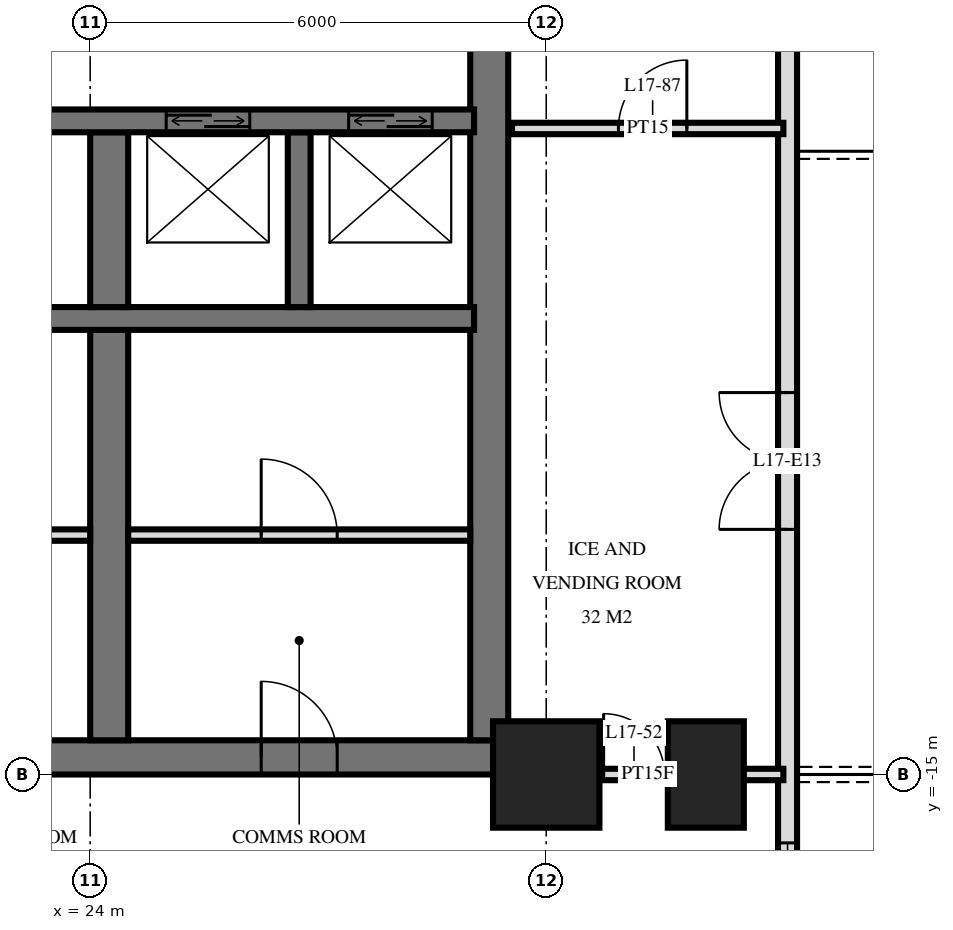
"""IFC4 building model, lengths in metres.
Left out: names, types, materials, properties, quantities, classifications, styles, units other than length and angle.
Written with IfcOpenShell. Run it as: python <this file> out.ifc"""

import sys

from ifc_helpers import new_model, si_unit, direction, frame, frame_2d, origin, origin_2d, place, context, subcontext, project, spatial, rectangle, extrude, element, fill, save


model = new_model("IFC4")
c1 = context("Model", 3, precision=1e-05, world=origin(), true_north=direction((0.0, 1.0)))
c2 = subcontext(c1, "Body", "Model", "MODEL_VIEW")
j1 = project(units=[si_unit("LENGTHUNIT", "METRE"), si_unit("PLANEANGLEUNIT", "RADIAN")], contexts=[c1])
p1 = place(None, origin())
s1 = spatial("IfcSite", under=j1, at=p1, CompositionType="ELEMENT")
p2 = place(p1, origin())
s2 = spatial("IfcBuilding", under=s1, at=p2, CompositionType="ELEMENT")
p3 = place(p2, frame((0.0, 0.0, 70.8)))
s3 = spatial("IfcBuildingStorey", under=s2, at=p3, CompositionType="ELEMENT", Elevation=70.8)
p4 = place(p3, frame((30.0, -15.0, 0.0), z_axis=(0.0, 0.0, 1.0), x_axis=(1.0, 0.0, 0.0)))
e1 = element("IfcColumn", 1, at=p4, inside=s3, PredefinedType="COLUMN", context=c2, shape_type="SweptSolid", body=[
    extrude(rectangle(XDim=1.4, YDim=1.4, at=origin_2d()), origin(), (0.0, 0.0, 1.0), 3.6),
])
p5 = place(p3, frame((32.1, -15.0, 0.0), z_axis=(0.0, 0.0, 1.0), x_axis=(0.0, 1.0, 0.0)))
e2 = element("IfcColumn", 2, at=p5, inside=s3, PredefinedType="COLUMN", context=c2, shape_type="SweptSolid", body=[
    extrude(rectangle(XDim=1.4, YDim=1.0, at=origin_2d()), origin(), (0.0, 0.0, 1.0), 3.6),
])
p6 = place(p3, frame((10.0, -14.775, 0.0), z_axis=(0.0, 0.0, 1.0), x_axis=(1.0, 0.0, 0.0)))
e3 = element("IfcWall", 3, at=p6, inside=s3, PredefinedType="SHEAR", context=c2, shape_type="SweptSolid", body=[
    extrude(rectangle(XDim=19.5, YDim=0.45, at=frame_2d((9.75, 0.0))), origin(), (0.0, 0.0, 1.0), 3.6),
])
p7 = place(p6, frame((7.1, 0.0, 0.0)))
e4 = element("IfcOpeningElement", 4, at=p7, cuts=e3, PredefinedType="OPENING", context=c2, shape_type="SweptSolid", body=[
    extrude(rectangle(XDim=1.2, YDim=2.1, at=frame_2d((0.6, 1.05))), frame((0.0, 0.235, 0.0), z_axis=(0.0, -1.0, 0.0), x_axis=(1.0, 0.0, 0.0)), (0.0, 0.0, 1.0), 0.47),
])
p8 = place(p6, frame((4.15, 0.0, 0.0)))
e5 = element("IfcOpeningElement", 5, at=p8, cuts=e3, PredefinedType="OPENING", context=c2, shape_type="SweptSolid", body=[
    extrude(rectangle(XDim=1.1, YDim=2.1, at=frame_2d((0.55, 1.05))), frame((0.0, 0.235, 0.0), z_axis=(0.0, -1.0, 0.0), x_axis=(1.0, 0.0, 0.0)), (0.0, 0.0, 1.0), 0.47),
])
p9 = place(p6, frame((10.1, 0.0, 0.0)))
e6 = element("IfcOpeningElement", 6, at=p9, cuts=e3, PredefinedType="OPENING", context=c2, shape_type="SweptSolid", body=[
    extrude(rectangle(XDim=0.9, YDim=2.1, at=frame_2d((0.45, 1.05))), frame((0.0, 0.235, 0.0), z_axis=(0.0, -1.0, 0.0), x_axis=(1.0, 0.0, 0.0)), (0.0, 0.0, 1.0), 0.47),
])
p10 = place(p6, frame((12.45, 0.0, 0.0)))
e7 = element("IfcOpeningElement", 7, at=p10, cuts=e3, PredefinedType="OPENING", context=c2, shape_type="SweptSolid", body=[
    extrude(rectangle(XDim=1.0, YDim=2.1, at=frame_2d((0.5, 1.05))), frame((0.0, 0.235, 0.0), z_axis=(0.0, -1.0, 0.0), x_axis=(1.0, 0.0, 0.0)), (0.0, 0.0, 1.0), 0.47),
])
p11 = place(p6, frame((16.25, 0.0, 0.0)))
e8 = element("IfcOpeningElement", 8, at=p11, cuts=e3, PredefinedType="OPENING", context=c2, shape_type="SweptSolid", body=[
    extrude(rectangle(XDim=1.0, YDim=2.1, at=frame_2d((0.5, 1.05))), frame((0.0, 0.235, 0.0), z_axis=(0.0, -1.0, 0.0), x_axis=(1.0, 0.0, 0.0)), (0.0, 0.0, 1.0), 0.47),
])
p12 = place(p3, frame((29.25, -14.55, 0.0), z_axis=(0.0, 0.0, 1.0), x_axis=(0.0, 1.0, 0.0)))
e9 = element("IfcWall", 9, at=p12, inside=s3, PredefinedType="SHEAR", context=c2, shape_type="SweptSolid", body=[
    extrude(rectangle(XDim=14.1, YDim=0.5, at=frame_2d((7.05, 0.0))), origin(), (0.0, 0.0, 1.0), 3.6),
])
p13 = place(p3, frame((10.35, -6.4, 0.0), z_axis=(0.0, 0.0, 1.0), x_axis=(1.0, 0.0, 0.0)))
e10 = element("IfcWall", 10, at=p13, inside=s3, PredefinedType="SHEAR", context=c2, shape_type="SweptSolid", body=[
    extrude(rectangle(XDim=18.7, YDim=0.3, at=frame_2d((9.35, 0.0))), origin(), (0.0, 0.0, 1.0), 3.6),
])
p14 = place(p13, frame((14.65, 0.0, 0.0)))
e11 = element("IfcOpeningElement", 11, at=p14, cuts=e10, PredefinedType="OPENING", context=c2, shape_type="SweptSolid", body=[
    extrude(rectangle(XDim=1.1, YDim=2.1, at=frame_2d((0.55, 1.05))), frame((0.0, 0.16, 0.0), z_axis=(0.0, -1.0, 0.0), x_axis=(1.0, 0.0, 0.0)), (0.0, 0.0, 1.0), 0.32),
])
p15 = place(p13, frame((17.05, 0.0, 0.0)))
e12 = element("IfcOpeningElement", 12, at=p15, cuts=e10, PredefinedType="OPENING", context=c2, shape_type="SweptSolid", body=[
    extrude(rectangle(XDim=1.1, YDim=2.1, at=frame_2d((0.55, 1.05))), frame((0.0, 0.16, 0.0), z_axis=(0.0, -1.0, 0.0), x_axis=(1.0, 0.0, 0.0)), (0.0, 0.0, 1.0), 0.32),
])
p16 = place(p13, frame((6.8, 0.0, 0.0)))
e13 = element("IfcOpeningElement", 13, at=p16, cuts=e10, PredefinedType="OPENING", context=c2, shape_type="SweptSolid", body=[
    extrude(rectangle(XDim=1.1, YDim=2.1, at=frame_2d((0.55, 1.05))), frame((0.0, 0.16, 0.0), z_axis=(0.0, -1.0, 0.0), x_axis=(1.0, 0.0, 0.0)), (0.0, 0.0, 1.0), 0.32),
])
p17 = place(p13, frame((12.1, 0.0, 0.0)))
e14 = element("IfcOpeningElement", 14, at=p17, cuts=e10, PredefinedType="OPENING", context=c2, shape_type="SweptSolid", body=[
    extrude(rectangle(XDim=1.0, YDim=2.1, at=frame_2d((0.5, 1.05))), frame((0.0, 0.16, 0.0), z_axis=(0.0, -1.0, 0.0), x_axis=(1.0, 0.0, 0.0)), (0.0, 0.0, 1.0), 0.32),
])
p18 = place(p3, frame((10.35, -9.0, 0.0), z_axis=(0.0, 0.0, 1.0), x_axis=(1.0, 0.0, 0.0)))
e15 = element("IfcWall", 15, at=p18, inside=s3, PredefinedType="SHEAR", context=c2, shape_type="SweptSolid", body=[
    extrude(rectangle(XDim=18.7, YDim=0.3, at=frame_2d((9.35, 0.0))), origin(), (0.0, 0.0, 1.0), 3.6),
])
p19 = place(p18, frame((3.8, 0.0, 0.0)))
e16 = element("IfcOpeningElement", 16, at=p19, cuts=e15, PredefinedType="OPENING", context=c2, shape_type="SweptSolid", body=[
    extrude(rectangle(XDim=1.1, YDim=2.1, at=frame_2d((0.55, 1.05))), frame((0.0, 0.16, 0.0), z_axis=(0.0, -1.0, 0.0), x_axis=(1.0, 0.0, 0.0)), (0.0, 0.0, 1.0), 0.32),
])
p20 = place(p3, frame((24.25, -8.85, 0.0), z_axis=(0.0, 0.0, 1.0), x_axis=(0.0, 1.0, 0.0)))
e17 = element("IfcWall", 17, at=p20, inside=s3, PredefinedType="SHEAR", context=c2, shape_type="SweptSolid", body=[
    extrude(rectangle(XDim=2.3, YDim=0.5, at=frame_2d((1.15, 0.0))), origin(), (0.0, 0.0, 1.0), 3.6),
])
p21 = place(p3, frame((24.25, -14.55, 0.0), z_axis=(0.0, 0.0, 1.0), x_axis=(0.0, 1.0, 0.0)))
e18 = element("IfcWall", 18, at=p21, inside=s3, PredefinedType="SHEAR", context=c2, shape_type="SweptSolid", body=[
    extrude(rectangle(XDim=5.4, YDim=0.5, at=frame_2d((2.7, 0.0))), origin(), (0.0, 0.0, 1.0), 3.6),
])
p22 = place(p3, frame((26.75, -8.85, 0.0), z_axis=(0.0, 0.0, 1.0), x_axis=(0.0, 1.0, 0.0)))
e19 = element("IfcWall", 19, at=p22, inside=s3, PredefinedType="SHEAR", context=c2, shape_type="SweptSolid", body=[
    extrude(rectangle(XDim=2.3, YDim=0.3, at=frame_2d((1.15, 0.0))), origin(), (0.0, 0.0, 1.0), 3.6),
])
p23 = place(p3, frame((33.175, -24.875, 0.0), z_axis=(0.0, 0.0, 1.0), x_axis=(0.0, 1.0, 0.0)))
e20 = element("IfcWall", 20, at=p23, inside=s3, PredefinedType="SOLIDWALL", context=c2, shape_type="SweptSolid", body=[
    extrude(rectangle(XDim=21.551, YDim=0.25, at=frame_2d((10.775, 0.0))), origin(), (0.0, 0.0, 1.0), 3.32),
])
p24 = place(p23, frame((0.575, 0.0, 0.0)))
e21 = element("IfcOpeningElement", 21, at=p24, cuts=e20, PredefinedType="OPENING", context=c2, shape_type="SweptSolid", body=[
    extrude(rectangle(XDim=1.8, YDim=2.4, at=frame_2d((0.9, 1.2))), frame((0.0, 0.135, 0.0), z_axis=(0.0, -1.0, 0.0), x_axis=(1.0, 0.0, 0.0)), (0.0, 0.0, 1.0), 0.27),
])
p25 = place(p23, frame((4.475, 0.0, 0.0)))
e22 = element("IfcOpeningElement", 22, at=p25, cuts=e20, PredefinedType="OPENING", context=c2, shape_type="SweptSolid", body=[
    extrude(rectangle(XDim=1.8, YDim=2.4, at=frame_2d((0.9, 1.2))), frame((0.0, 0.135, 0.0), z_axis=(0.0, -1.0, 0.0), x_axis=(1.0, 0.0, 0.0)), (0.0, 0.0, 1.0), 0.27),
])
p26 = place(p23, frame((7.775, 0.0, 0.3)))
e23 = element("IfcOpeningElement", 23, at=p26, cuts=e20, PredefinedType="OPENING", context=c2, shape_type="SweptSolid", body=[
    extrude(rectangle(XDim=1.2, YDim=2.1, at=frame_2d((0.6, 1.05))), frame((0.0, 0.135, 0.0), z_axis=(0.0, -1.0, 0.0), x_axis=(1.0, 0.0, 0.0)), (0.0, 0.0, 1.0), 0.27),
])
p27 = place(p23, frame((13.1, 0.0, 0.0)))
e24 = element("IfcOpeningElement", 24, at=p27, cuts=e20, PredefinedType="OPENING", context=c2, shape_type="SweptSolid", body=[
    extrude(rectangle(XDim=1.8, YDim=2.4, at=frame_2d((0.9, 1.2))), frame((0.0, 0.135, 0.0), z_axis=(0.0, -1.0, 0.0), x_axis=(1.0, 0.0, 0.0)), (0.0, 0.0, 1.0), 0.27),
])
p28 = place(p3, frame((21.9, -11.85, 0.0), z_axis=(0.0, 0.0, 1.0), x_axis=(1.0, 0.0, 0.0)))
e25 = element("IfcWall", 25, at=p28, inside=s3, PredefinedType="PARTITIONING", context=c2, shape_type="SweptSolid", body=[
    extrude(rectangle(XDim=2.1, YDim=0.15, at=frame_2d((1.05, 0.0))), origin(), (0.0, 0.0, 1.0), 3.3),
])
p29 = place(p28, frame((0.55, 0.0, 0.0)))
e26 = element("IfcOpeningElement", 26, at=p29, cuts=e25, PredefinedType="OPENING", context=c2, shape_type="SweptSolid", body=[
    extrude(rectangle(XDim=1.0, YDim=2.1, at=frame_2d((0.5, 1.05))), frame((0.0, 0.085, 0.0), z_axis=(0.0, -1.0, 0.0), x_axis=(1.0, 0.0, 0.0)), (0.0, 0.0, 1.0), 0.17),
])
p30 = place(p3, frame((24.5, -11.85, 0.0), z_axis=(0.0, 0.0, 1.0), x_axis=(1.0, 0.0, 0.0)))
e27 = element("IfcWall", 27, at=p30, inside=s3, PredefinedType="PARTITIONING", context=c2, shape_type="SweptSolid", body=[
    extrude(rectangle(XDim=4.5, YDim=0.15, at=frame_2d((2.25, 0.0))), origin(), (0.0, 0.0, 1.0), 3.3),
])
p31 = place(p30, frame((1.75, 0.0, 0.0)))
e28 = element("IfcOpeningElement", 28, at=p31, cuts=e27, PredefinedType="OPENING", context=c2, shape_type="SweptSolid", body=[
    extrude(rectangle(XDim=1.0, YDim=2.1, at=frame_2d((0.5, 1.05))), frame((0.0, 0.085, 0.0), z_axis=(0.0, -1.0, 0.0), x_axis=(1.0, 0.0, 0.0)), (0.0, 0.0, 1.0), 0.17),
])
p32 = place(p3, frame((29.55, -15.0, 0.0), z_axis=(0.0, 0.0, 1.0), x_axis=(1.0, 0.0, 0.0)))
e29 = element("IfcWall", 29, at=p32, inside=s3, PredefinedType="PARTITIONING", context=c2, shape_type="SweptSolid", body=[
    extrude(rectangle(XDim=3.57, YDim=0.15, at=frame_2d((1.785, 0.0))), origin(), (0.0, 0.0, 1.0), 3.32),
])
p33 = place(p32, frame((1.205, 0.0, 0.0)))
e30 = element("IfcOpeningElement", 30, at=p33, cuts=e29, PredefinedType="OPENING", context=c2, shape_type="SweptSolid", body=[
    extrude(rectangle(XDim=0.8, YDim=2.1, at=frame_2d((0.4, 1.05))), frame((0.0, 0.085, 0.0), z_axis=(0.0, -1.0, 0.0), x_axis=(1.0, 0.0, 0.0)), (0.0, 0.0, 1.0), 0.17),
])
p34 = place(p3, frame((29.55, -6.5, 0.0), z_axis=(0.0, 0.0, 1.0), x_axis=(1.0, 0.0, 0.0)))
e31 = element("IfcWall", 31, at=p34, inside=s3, PredefinedType="PARTITIONING", context=c2, shape_type="SweptSolid", body=[
    extrude(rectangle(XDim=3.57, YDim=0.15, at=frame_2d((1.785, 0.0))), origin(), (0.0, 0.0, 1.0), 3.32),
])
p35 = place(p34, frame((1.4, 0.0, 0.0)))
e32 = element("IfcOpeningElement", 32, at=p35, cuts=e31, PredefinedType="OPENING", context=c2, shape_type="SweptSolid", body=[
    extrude(rectangle(XDim=0.9, YDim=2.1, at=frame_2d((0.45, 1.05))), frame((0.0, 0.085, 0.0), z_axis=(0.0, -1.0, 0.0), x_axis=(1.0, 0.0, 0.0)), (0.0, 0.0, 1.0), 0.17),
])
p36 = place(p26, origin())
e33 = element("IfcWindow", 33, at=p36, inside=s3, PartitioningType="SINGLE_PANEL", PredefinedType="WINDOW", context=c2, shape_type="SweptSolid", body=[
    extrude(rectangle(XDim=1.2, YDim=2.1, at=frame_2d((0.6, 1.05))), frame((0.0, 0.03, 0.0), z_axis=(0.0, -1.0, 0.0), x_axis=(1.0, 0.0, 0.0)), (0.0, 0.0, 1.0), 0.06),
])
fill(e23, e33)
p37 = place(p27, origin())
e34 = element("IfcDoor", 34, at=p37, inside=s3, OperationType="DOUBLE_DOOR_SINGLE_SWING", PredefinedType="DOOR", context=c2, shape_type="SweptSolid", body=[
    extrude(rectangle(XDim=1.8, YDim=2.4, at=frame_2d((0.9, 1.2))), frame((0.0, 0.025, 0.0), z_axis=(0.0, -1.0, 0.0), x_axis=(1.0, 0.0, 0.0)), (0.0, 0.0, 1.0), 0.05),
])
fill(e24, e34)
p38 = place(p14, origin())
e35 = element("IfcDoor", 35, at=p38, inside=s3, OperationType="DOUBLE_DOOR_SLIDING", PredefinedType="USERDEFINED", context=c2, shape_type="SweptSolid", body=[
    extrude(rectangle(XDim=1.1, YDim=2.1, at=frame_2d((0.55, 1.05))), frame((0.0, 0.025, 0.0), z_axis=(0.0, -1.0, 0.0), x_axis=(1.0, 0.0, 0.0)), (0.0, 0.0, 1.0), 0.05),
])
fill(e11, e35)
p39 = place(p15, origin())
e36 = element("IfcDoor", 36, at=p39, inside=s3, OperationType="DOUBLE_DOOR_SLIDING", PredefinedType="USERDEFINED", context=c2, shape_type="SweptSolid", body=[
    extrude(rectangle(XDim=1.1, YDim=2.1, at=frame_2d((0.55, 1.05))), frame((0.0, 0.025, 0.0), z_axis=(0.0, -1.0, 0.0), x_axis=(1.0, 0.0, 0.0)), (0.0, 0.0, 1.0), 0.05),
])
fill(e12, e36)
p40 = place(p11, origin())
e37 = element("IfcDoor", 37, at=p40, inside=s3, OperationType="SINGLE_SWING_RIGHT", PredefinedType="DOOR", context=c2, shape_type="SweptSolid", body=[
    extrude(rectangle(XDim=1.0, YDim=2.1, at=frame_2d((0.5, 1.05))), frame((0.0, 0.025, 0.0), z_axis=(0.0, -1.0, 0.0), x_axis=(1.0, 0.0, 0.0)), (0.0, 0.0, 1.0), 0.05),
])
fill(e8, e37)
p41 = place(p31, origin())
e38 = element("IfcDoor", 38, at=p41, inside=s3, OperationType="SINGLE_SWING_RIGHT", PredefinedType="DOOR", context=c2, shape_type="SweptSolid", body=[
    extrude(rectangle(XDim=1.0, YDim=2.1, at=frame_2d((0.5, 1.05))), frame((0.0, 0.025, 0.0), z_axis=(0.0, -1.0, 0.0), x_axis=(1.0, 0.0, 0.0)), (0.0, 0.0, 1.0), 0.05),
])
fill(e28, e38)
p42 = place(p33, origin())
e39 = element("IfcDoor", 39, at=p42, inside=s3, OperationType="SINGLE_SWING_RIGHT", PredefinedType="DOOR", context=c2, shape_type="SweptSolid", body=[
    extrude(rectangle(XDim=0.8, YDim=2.1, at=frame_2d((0.4, 1.05))), frame((0.0, 0.025, 0.0), z_axis=(0.0, -1.0, 0.0), x_axis=(1.0, 0.0, 0.0)), (0.0, 0.0, 1.0), 0.05),
])
fill(e30, e39)
p43 = place(p35, origin())
e40 = element("IfcDoor", 40, at=p43, inside=s3, OperationType="SINGLE_SWING_LEFT", PredefinedType="DOOR", context=c2, shape_type="SweptSolid", body=[
    extrude(rectangle(XDim=0.9, YDim=2.1, at=frame_2d((0.45, 1.05))), frame((0.0, 0.025, 0.0), z_axis=(0.0, -1.0, 0.0), x_axis=(1.0, 0.0, 0.0)), (0.0, 0.0, 1.0), 0.05),
])
fill(e32, e40)
save(model, sys.argv[1])
